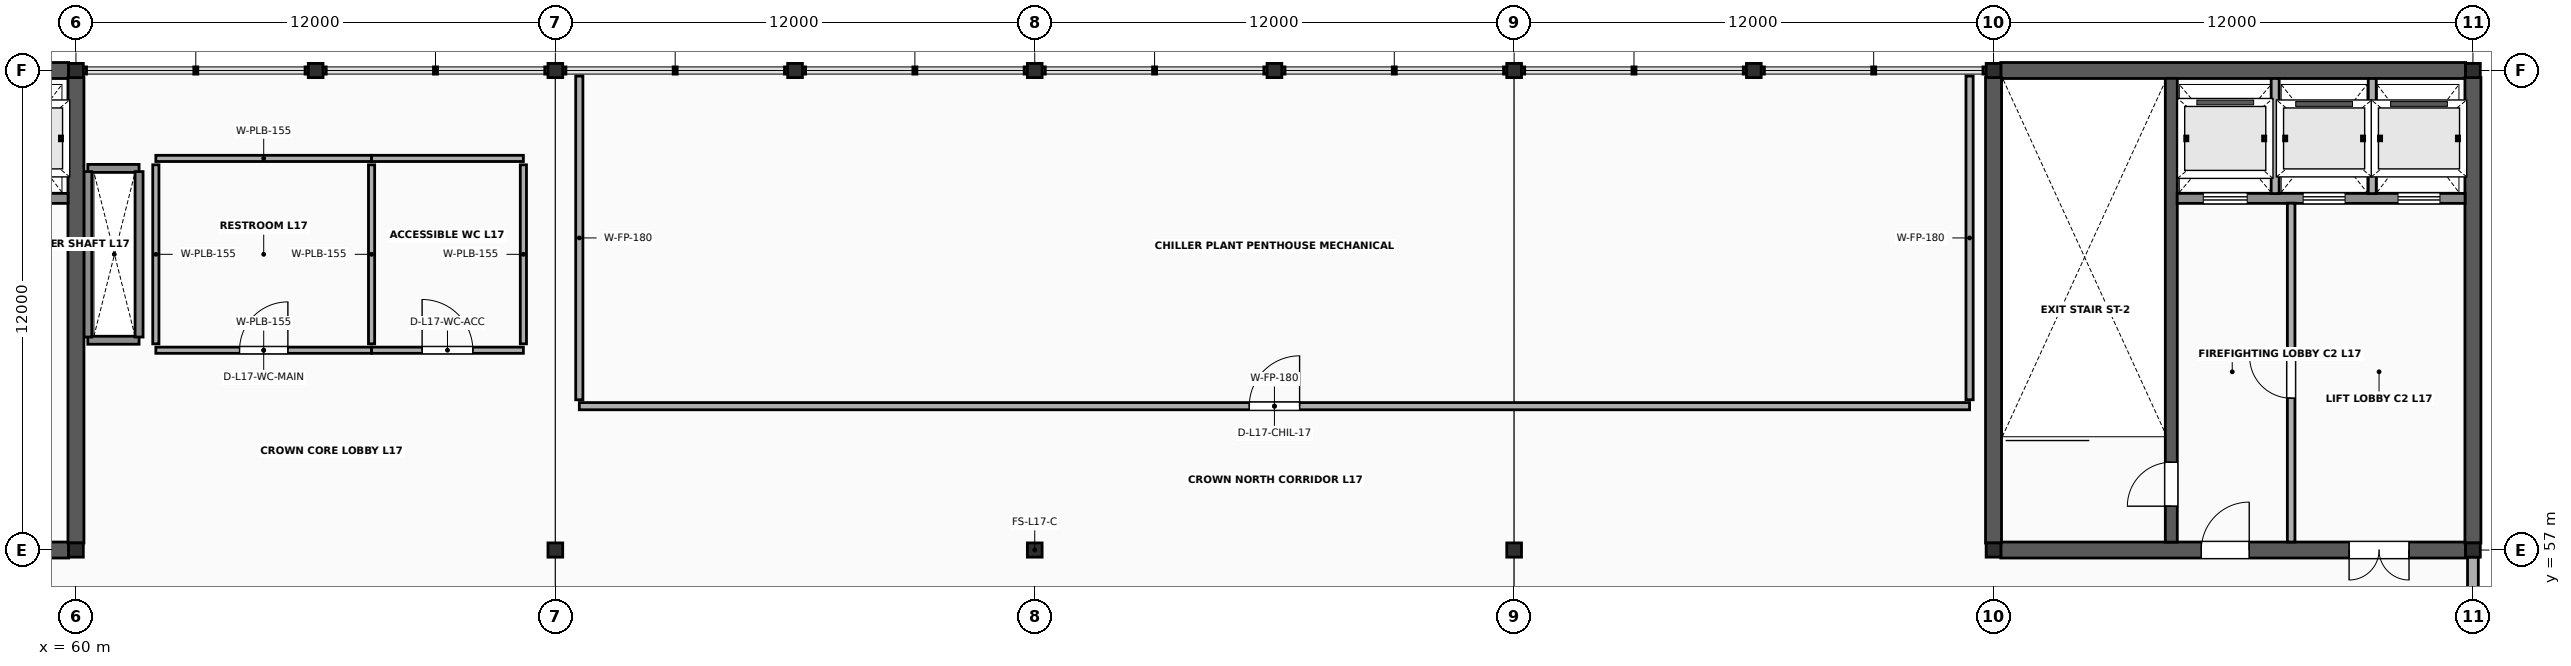
"""IFC4 building model, lengths in metres.
Left out: names, types, materials, properties, quantities, classifications, styles, units other than length and angle.
Written with IfcOpenShell. Run it as: python <this file> out.ifc"""

import sys

from ifc_helpers import new_model, si_unit, direction, frame, frame_2d, origin, origin_2d, place, context, subcontext, project, spatial, rectangle, i_section, extrude, element, fill, save


model = new_model("IFC4")
c1 = context("Model", 3, precision=1e-05, world=origin(), true_north=direction((0.0, 1.0)))
c2 = subcontext(c1, "Body", "Model", "MODEL_VIEW")
j1 = project(units=[si_unit("LENGTHUNIT", "METRE"), si_unit("PLANEANGLEUNIT", "RADIAN")], contexts=[c1])
p1 = place(None, origin())
s1 = spatial("IfcSite", under=j1, at=p1, CompositionType="ELEMENT")
p2 = place(p1, origin())
s2 = spatial("IfcBuilding", under=s1, at=p2, CompositionType="ELEMENT")
p3 = place(p2, frame((0.0, 0.0, 69.6)))
s3 = spatial("IfcBuildingStorey", under=s2, at=p3, CompositionType="ELEMENT", Elevation=69.6)
for number, where, z_axis, x_axis in (
    (1, (60.0, 57.0, 0.0), (0.0, 0.0, 1.0), (1.0, 0.0, 0.0)),
    (2, (60.0, 69.0, 0.0), (0.0, 0.0, 1.0), (1.0, 0.0, 0.0)),
    (3, (72.0, 57.0, 0.0), (0.0, 0.0, 1.0), (1.0, 0.0, 0.0)),
    (4, (72.0, 69.0, 0.0), (0.0, 0.0, 1.0), (1.0, 0.0, 0.0)),
    (5, (84.0, 57.0, 0.0), (0.0, 0.0, 1.0), (1.0, 0.0, 0.0)),
    (6, (84.0, 69.0, 0.0), (0.0, 0.0, 1.0), (1.0, 0.0, 0.0)),
    (7, (96.0, 57.0, 0.0), (0.0, 0.0, 1.0), (1.0, 0.0, 0.0)),
    (8, (96.0, 69.0, 0.0), (0.0, 0.0, 1.0), (1.0, 0.0, 0.0)),
    (9, (108.0, 57.0, 0.0), (0.0, 0.0, 1.0), (1.0, 0.0, 0.0)),
    (10, (108.0, 69.0, 0.0), (0.0, 0.0, 1.0), (1.0, 0.0, 0.0)),
    (11, (120.0, 57.0, 0.0), (0.0, 0.0, 1.0), (1.0, 0.0, 0.0)),
    (12, (120.0, 69.0, 0.0), (0.0, 0.0, 1.0), (1.0, 0.0, 0.0)),
    (13, (66.0, 69.0, 0.0), (0.0, 0.0, 1.0), (1.0, 0.0, 0.0)),
    (14, (78.0, 69.0, 0.0), (0.0, 0.0, 1.0), (1.0, 0.0, 0.0)),
    (15, (90.0, 69.0, 0.0), (0.0, 0.0, 1.0), (1.0, 0.0, 0.0)),
    (16, (102.0, 69.0, 0.0), (0.0, 0.0, 1.0), (1.0, 0.0, 0.0)),
):
    element("IfcColumn", number, at=place(p3, frame(where, z_axis=z_axis, x_axis=x_axis)), inside=s3, PredefinedType="COLUMN", context=c2, shape_type="SweptSolid", body=[
        extrude(i_section(OverallWidth=0.369, OverallDepth=0.356, WebThickness=0.011, FlangeThickness=0.018, FilletRadius=0.018, at=origin_2d()), origin(), (0.0, 0.0, 1.0), 4.6),
    ])
for number, where, z_axis, x_axis in (
    (17, (60.297, 62.25, 0.0), (0.0, 0.0, 1.0), (1.0, 0.0, 0.0)),
    (18, (60.297, 66.55, 0.0), (0.0, 0.0, 1.0), (1.0, 0.0, 0.0)),
):
    element("IfcWall", number, at=place(p3, frame(where, z_axis=z_axis, x_axis=x_axis)), inside=s3, PredefinedType="SOLIDWALL", context=c2, shape_type="SweptSolid", body=[
        extrude(rectangle(XDim=1.283, YDim=0.2, at=frame_2d((0.642, 0.0))), origin(), (0.0, 0.0, 1.0), 4.383),
    ])
for number, where, z_axis, x_axis in (
    (19, (60.297, 62.33, 0.0), (0.0, 0.0, 1.0), (0.0, 1.0, 0.0)),
    (20, (61.58, 62.33, 0.0), (0.0, 0.0, 1.0), (0.0, 1.0, 0.0)),
):
    element("IfcWall", number, at=place(p3, frame(where, z_axis=z_axis, x_axis=x_axis)), inside=s3, PredefinedType="SOLIDWALL", context=c2, shape_type="SweptSolid", body=[
        extrude(rectangle(XDim=4.14, YDim=0.2, at=frame_2d((2.07, 0.0))), origin(), (0.0, 0.0, 1.0), 4.383),
    ])
p4 = place(p3, frame((48.181, 57.0, 0.0), z_axis=(0.0, 0.0, 1.0), x_axis=(1.0, 0.0, 0.0)))
e21 = element("IfcWall", 21, at=p4, inside=s3, PredefinedType="SHEAR", context=c2, shape_type="SweptSolid", body=[
    extrude(rectangle(XDim=11.637, YDim=0.4, at=frame_2d((5.819, 0.0))), origin(), (0.0, 0.0, 1.0), 4.383),
])
p5 = place(p4, frame((5.019, 0.0, 0.0)))
e22 = element("IfcOpeningElement", 22, at=p5, cuts=e21, PredefinedType="OPENING", context=c2, shape_type="SweptSolid", body=[
    extrude(rectangle(XDim=1.2, YDim=2.2, at=frame_2d((0.6, 1.1))), frame((0.0, 0.215, 0.0), z_axis=(0.0, -1.0, 0.0), x_axis=(1.0, 0.0, 0.0)), (0.0, 0.0, 1.0), 0.43),
])
p6 = place(p4, frame((8.718, 0.0, 0.0)))
e23 = element("IfcOpeningElement", 23, at=p6, cuts=e21, PredefinedType="OPENING", context=c2, shape_type="SweptSolid", body=[
    extrude(rectangle(XDim=1.5, YDim=2.25, at=frame_2d((0.75, 1.125))), frame((0.0, 0.215, 0.0), z_axis=(0.0, -1.0, 0.0), x_axis=(1.0, 0.0, 0.0)), (0.0, 0.0, 1.0), 0.43),
])
p7 = place(p3, frame((48.181, 69.0, 0.0), z_axis=(0.0, 0.0, 1.0), x_axis=(1.0, 0.0, 0.0)))
e24 = element("IfcWall", 24, at=p7, inside=s3, PredefinedType="SHEAR", context=c2, shape_type="SweptSolid", body=[
    extrude(rectangle(XDim=11.637, YDim=0.4, at=frame_2d((5.819, 0.0))), origin(), (0.0, 0.0, 1.0), 4.383),
])
p8 = place(p3, frame((60.0, 57.175, 0.0), z_axis=(0.0, 0.0, 1.0), x_axis=(0.0, 1.0, 0.0)))
e25 = element("IfcWall", 25, at=p8, inside=s3, PredefinedType="SHEAR", context=c2, shape_type="SweptSolid", body=[
    extrude(rectangle(XDim=11.65, YDim=0.4, at=frame_2d((5.825, 0.0))), origin(), (0.0, 0.0, 1.0), 4.383),
])
p9 = place(p3, frame((52.597, 65.8, 0.0), z_axis=(0.0, 0.0, 1.0), x_axis=(1.0, 0.0, 0.0)))
e26 = element("IfcWall", 26, at=p9, inside=s3, PredefinedType="SOLIDWALL", context=c2, shape_type="SweptSolid", body=[
    extrude(rectangle(XDim=7.206, YDim=0.25, at=frame_2d((3.603, 0.0))), origin(), (0.0, 0.0, 1.0), 4.383),
])
p10 = place(p9, frame((0.653, 0.0, 0.0)))
e27 = element("IfcOpeningElement", 27, at=p10, cuts=e26, PredefinedType="OPENING", context=c2, shape_type="SweptSolid", body=[
    extrude(rectangle(XDim=1.1, YDim=2.24, at=frame_2d((0.55, 1.12))), frame((0.0, 0.14, 0.0), z_axis=(0.0, -1.0, 0.0), x_axis=(1.0, 0.0, 0.0)), (0.0, 0.0, 1.0), 0.28),
])
p11 = place(p9, frame((3.153, 0.0, 0.0)))
e28 = element("IfcOpeningElement", 28, at=p11, cuts=e26, PredefinedType="OPENING", context=c2, shape_type="SweptSolid", body=[
    extrude(rectangle(XDim=1.05, YDim=2.2, at=frame_2d((0.525, 1.1))), frame((0.0, 0.14, 0.0), z_axis=(0.0, -1.0, 0.0), x_axis=(1.0, 0.0, 0.0)), (0.0, 0.0, 1.0), 0.28),
])
p12 = place(p9, frame((5.528, 0.0, 0.0)))
e29 = element("IfcOpeningElement", 29, at=p12, cuts=e26, PredefinedType="OPENING", context=c2, shape_type="SweptSolid", body=[
    extrude(rectangle(XDim=1.05, YDim=2.2, at=frame_2d((0.525, 1.1))), frame((0.0, 0.14, 0.0), z_axis=(0.0, -1.0, 0.0), x_axis=(1.0, 0.0, 0.0)), (0.0, 0.0, 1.0), 0.28),
])
p13 = place(p3, frame((108.181, 57.0, 0.0), z_axis=(0.0, 0.0, 1.0), x_axis=(1.0, 0.0, 0.0)))
e30 = element("IfcWall", 30, at=p13, inside=s3, PredefinedType="SHEAR", context=c2, shape_type="SweptSolid", body=[
    extrude(rectangle(XDim=11.637, YDim=0.4, at=frame_2d((5.819, 0.0))), origin(), (0.0, 0.0, 1.0), 4.383),
])
p14 = place(p13, frame((5.019, 0.0, 0.0)))
e31 = element("IfcOpeningElement", 31, at=p14, cuts=e30, PredefinedType="OPENING", context=c2, shape_type="SweptSolid", body=[
    extrude(rectangle(XDim=1.2, YDim=2.2, at=frame_2d((0.6, 1.1))), frame((0.0, 0.215, 0.0), z_axis=(0.0, -1.0, 0.0), x_axis=(1.0, 0.0, 0.0)), (0.0, 0.0, 1.0), 0.43),
])
p15 = place(p13, frame((8.719, 0.0, 0.0)))
e32 = element("IfcOpeningElement", 32, at=p15, cuts=e30, PredefinedType="OPENING", context=c2, shape_type="SweptSolid", body=[
    extrude(rectangle(XDim=1.5, YDim=2.25, at=frame_2d((0.75, 1.125))), frame((0.0, 0.215, 0.0), z_axis=(0.0, -1.0, 0.0), x_axis=(1.0, 0.0, 0.0)), (0.0, 0.0, 1.0), 0.43),
])
p16 = place(p3, frame((108.181, 69.0, 0.0), z_axis=(0.0, 0.0, 1.0), x_axis=(1.0, 0.0, 0.0)))
e33 = element("IfcWall", 33, at=p16, inside=s3, PredefinedType="SHEAR", context=c2, shape_type="SweptSolid", body=[
    extrude(rectangle(XDim=11.637, YDim=0.4, at=frame_2d((5.819, 0.0))), origin(), (0.0, 0.0, 1.0), 4.383),
])
for number, where, z_axis, x_axis in (
    (34, (108.0, 57.175, 0.0), (0.0, 0.0, 1.0), (0.0, 1.0, 0.0)),
    (35, (120.0, 57.175, 0.0), (0.0, 0.0, 1.0), (0.0, 1.0, 0.0)),
):
    element("IfcWall", number, at=place(p3, frame(where, z_axis=z_axis, x_axis=x_axis)), inside=s3, PredefinedType="SHEAR", context=c2, shape_type="SweptSolid", body=[
        extrude(rectangle(XDim=11.65, YDim=0.4, at=frame_2d((5.825, 0.0))), origin(), (0.0, 0.0, 1.0), 4.383),
    ])
p17 = place(p3, frame((112.45, 57.197, 0.0), z_axis=(0.0, 0.0, 1.0), x_axis=(0.0, 1.0, 0.0)))
e36 = element("IfcWall", 36, at=p17, inside=s3, PredefinedType="SHEAR", context=c2, shape_type="SweptSolid", body=[
    extrude(rectangle(XDim=11.606, YDim=0.3, at=frame_2d((5.803, 0.0))), origin(), (0.0, 0.0, 1.0), 4.383),
])
p18 = place(p17, frame((0.9, 0.0, 0.0)))
e37 = element("IfcOpeningElement", 37, at=p18, cuts=e36, PredefinedType="OPENING", context=c2, shape_type="SweptSolid", body=[
    extrude(rectangle(XDim=1.1, YDim=2.2, at=frame_2d((0.55, 1.1))), frame((0.0, 0.165, 0.0), z_axis=(0.0, -1.0, 0.0), x_axis=(1.0, 0.0, 0.0)), (0.0, 0.0, 1.0), 0.33),
])
p19 = place(p3, frame((112.597, 65.8, 0.0), z_axis=(0.0, 0.0, 1.0), x_axis=(1.0, 0.0, 0.0)))
e38 = element("IfcWall", 38, at=p19, inside=s3, PredefinedType="SOLIDWALL", context=c2, shape_type="SweptSolid", body=[
    extrude(rectangle(XDim=7.206, YDim=0.25, at=frame_2d((3.603, 0.0))), origin(), (0.0, 0.0, 1.0), 4.383),
])
p20 = place(p19, frame((0.653, 0.0, 0.0)))
e39 = element("IfcOpeningElement", 39, at=p20, cuts=e38, PredefinedType="OPENING", context=c2, shape_type="SweptSolid", body=[
    extrude(rectangle(XDim=1.1, YDim=2.24, at=frame_2d((0.55, 1.12))), frame((0.0, 0.14, 0.0), z_axis=(0.0, -1.0, 0.0), x_axis=(1.0, 0.0, 0.0)), (0.0, 0.0, 1.0), 0.28),
])
p21 = place(p19, frame((3.153, 0.0, 0.0)))
e40 = element("IfcOpeningElement", 40, at=p21, cuts=e38, PredefinedType="OPENING", context=c2, shape_type="SweptSolid", body=[
    extrude(rectangle(XDim=1.05, YDim=2.2, at=frame_2d((0.525, 1.1))), frame((0.0, 0.14, 0.0), z_axis=(0.0, -1.0, 0.0), x_axis=(1.0, 0.0, 0.0)), (0.0, 0.0, 1.0), 0.28),
])
p22 = place(p19, frame((5.528, 0.0, 0.0)))
e41 = element("IfcOpeningElement", 41, at=p22, cuts=e38, PredefinedType="OPENING", context=c2, shape_type="SweptSolid", body=[
    extrude(rectangle(XDim=1.05, YDim=2.2, at=frame_2d((0.525, 1.1))), frame((0.0, 0.14, 0.0), z_axis=(0.0, -1.0, 0.0), x_axis=(1.0, 0.0, 0.0)), (0.0, 0.0, 1.0), 0.28),
])
for number, where, z_axis, x_axis in (
    (42, (115.05, 65.92, 0.0), (0.0, 0.0, 1.0), (0.0, 1.0, 0.0)),
    (43, (117.48, 65.92, 0.0), (0.0, 0.0, 1.0), (0.0, 1.0, 0.0)),
):
    element("IfcWall", number, at=place(p3, frame(where, z_axis=z_axis, x_axis=x_axis)), inside=s3, PredefinedType="SOLIDWALL", context=c2, shape_type="SweptSolid", body=[
        extrude(rectangle(XDim=2.88, YDim=0.2, at=frame_2d((1.44, 0.0))), origin(), (0.0, 0.0, 1.0), 4.373),
    ])
p23 = place(p3, frame((115.45, 57.2, 0.0), z_axis=(0.0, 0.0, 1.0), x_axis=(0.0, 1.0, 0.0)))
e44 = element("IfcWall", 44, at=p23, inside=s3, PredefinedType="SOLIDWALL", context=c2, shape_type="SweptSolid", body=[
    extrude(rectangle(XDim=8.48, YDim=0.19, at=frame_2d((4.24, 0.0))), origin(), (0.0, 0.0, 1.0), 4.373),
])
p24 = place(p23, frame((3.6, 0.0, 0.0)))
e45 = element("IfcOpeningElement", 45, at=p24, cuts=e44, PredefinedType="OPENING", context=c2, shape_type="SweptSolid", body=[
    extrude(rectangle(XDim=1.04, YDim=2.18, at=frame_2d((0.52, 1.09))), frame((0.0, 0.11, 0.0), z_axis=(0.0, -1.0, 0.0), x_axis=(1.0, 0.0, 0.0)), (0.0, 0.0, 1.0), 0.22),
])
p25 = place(p3, frame((120.0, 45.176, 0.0), z_axis=(0.0, 0.0, 1.0), x_axis=(0.0, 1.0, 0.0)))
e46 = element("IfcWall", 46, at=p25, inside=s3, PredefinedType="SOLIDWALL", context=c2, shape_type="SweptSolid", body=[
    extrude(rectangle(XDim=11.648, YDim=0.27, at=frame_2d((5.824, 0.0))), origin(), (0.0, 0.0, 1.0), 3.836),
])
p26 = place(p25, frame((4.399, 0.0, 1.4)))
e47 = element("IfcOpeningElement", 47, at=p26, cuts=e46, PredefinedType="OPENING", context=c2, shape_type="SweptSolid", body=[
    extrude(rectangle(XDim=2.85, YDim=0.88, at=frame_2d((1.425, 0.44))), frame((0.0, 0.15, 0.0), z_axis=(0.0, -1.0, 0.0), x_axis=(1.0, 0.0, 0.0)), (0.0, 0.0, 1.0), 0.3),
])
p27 = place(p3, frame((62.0, 62.0, 0.0), z_axis=(0.0, 0.0, 1.0), x_axis=(1.0, 0.0, 0.0)))
e48 = element("IfcWall", 48, at=p27, inside=s3, PredefinedType="PLUMBINGWALL", context=c2, shape_type="SweptSolid", body=[
    extrude(rectangle(XDim=5.4, YDim=0.155, at=frame_2d((2.7, 0.0))), origin(), (0.0, 0.0, 1.0), 2.88),
])
p28 = place(p27, frame((2.095, 0.0, 0.0)))
e49 = element("IfcOpeningElement", 49, at=p28, cuts=e48, PredefinedType="OPENING", context=c2, shape_type="SweptSolid", body=[
    extrude(rectangle(XDim=1.21, YDim=2.25, at=frame_2d((0.605, 1.125))), frame((0.0, 0.093, 0.0), z_axis=(0.0, -1.0, 0.0), x_axis=(1.0, 0.0, 0.0)), (0.0, 0.0, 1.0), 0.185),
])
p29 = place(p3, frame((62.0, 66.8, 0.0), z_axis=(0.0, 0.0, 1.0), x_axis=(1.0, 0.0, 0.0)))
e50 = element("IfcWall", 50, at=p29, inside=s3, PredefinedType="PLUMBINGWALL", context=c2, shape_type="SweptSolid", body=[
    extrude(rectangle(XDim=5.4, YDim=0.155, at=frame_2d((2.7, 0.0))), origin(), (0.0, 0.0, 1.0), 2.88),
])
for number, where, z_axis, x_axis in (
    (51, (62.0, 62.16, 0.0), (0.0, 0.0, 1.0), (0.0, 1.0, 0.0)),
    (52, (67.4, 62.16, 0.0), (0.0, 0.0, 1.0), (0.0, 1.0, 0.0)),
):
    element("IfcWall", number, at=place(p3, frame(where, z_axis=z_axis, x_axis=x_axis)), inside=s3, PredefinedType="PLUMBINGWALL", context=c2, shape_type="SweptSolid", body=[
        extrude(rectangle(XDim=4.48, YDim=0.155, at=frame_2d((2.24, 0.0))), origin(), (0.0, 0.0, 1.0), 2.88),
    ])
p30 = place(p3, frame((67.4, 62.0, 0.0), z_axis=(0.0, 0.0, 1.0), x_axis=(1.0, 0.0, 0.0)))
e53 = element("IfcWall", 53, at=p30, inside=s3, PredefinedType="PLUMBINGWALL", context=c2, shape_type="SweptSolid", body=[
    extrude(rectangle(XDim=3.8, YDim=0.155, at=frame_2d((1.9, 0.0))), origin(), (0.0, 0.0, 1.0), 2.88),
])
p31 = place(p30, frame((1.265, 0.0, 0.0)))
e54 = element("IfcOpeningElement", 54, at=p31, cuts=e53, PredefinedType="OPENING", context=c2, shape_type="SweptSolid", body=[
    extrude(rectangle(XDim=1.27, YDim=2.27, at=frame_2d((0.635, 1.135))), frame((0.0, 0.093, 0.0), z_axis=(0.0, -1.0, 0.0), x_axis=(1.0, 0.0, 0.0)), (0.0, 0.0, 1.0), 0.185),
])
p32 = place(p3, frame((67.4, 66.8, 0.0), z_axis=(0.0, 0.0, 1.0), x_axis=(1.0, 0.0, 0.0)))
e55 = element("IfcWall", 55, at=p32, inside=s3, PredefinedType="PLUMBINGWALL", context=c2, shape_type="SweptSolid", body=[
    extrude(rectangle(XDim=3.8, YDim=0.155, at=frame_2d((1.9, 0.0))), origin(), (0.0, 0.0, 1.0), 2.88),
])
p33 = place(p3, frame((71.2, 62.16, 0.0), z_axis=(0.0, 0.0, 1.0), x_axis=(0.0, 1.0, 0.0)))
e56 = element("IfcWall", 56, at=p33, inside=s3, PredefinedType="PLUMBINGWALL", context=c2, shape_type="SweptSolid", body=[
    extrude(rectangle(XDim=4.48, YDim=0.155, at=frame_2d((2.24, 0.0))), origin(), (0.0, 0.0, 1.0), 2.88),
])
p34 = place(p3, frame((72.6, 60.6, 0.0), z_axis=(0.0, 0.0, 1.0), x_axis=(1.0, 0.0, 0.0)))
e57 = element("IfcWall", 57, at=p34, inside=s3, PredefinedType="SOLIDWALL", context=c2, shape_type="SweptSolid", body=[
    extrude(rectangle(XDim=34.8, YDim=0.18, at=frame_2d((17.4, 0.0))), origin(), (0.0, 0.0, 1.0), 2.88),
])
p35 = place(p34, frame((16.77, 0.0, 0.0)))
e58 = element("IfcOpeningElement", 58, at=p35, cuts=e57, PredefinedType="OPENING", context=c2, shape_type="SweptSolid", body=[
    extrude(rectangle(XDim=1.26, YDim=2.16, at=frame_2d((0.63, 1.08))), frame((0.0, 0.105, 0.0), z_axis=(0.0, -1.0, 0.0), x_axis=(1.0, 0.0, 0.0)), (0.0, 0.0, 1.0), 0.21),
])
for number, where, z_axis, x_axis in (
    (59, (72.6, 60.76, 0.0), (0.0, 0.0, 1.0), (0.0, 1.0, 0.0)),
    (60, (107.4, 60.76, 0.0), (0.0, 0.0, 1.0), (0.0, 1.0, 0.0)),
):
    element("IfcWall", number, at=place(p3, frame(where, z_axis=z_axis, x_axis=x_axis)), inside=s3, PredefinedType="SOLIDWALL", context=c2, shape_type="SweptSolid", body=[
        extrude(rectangle(XDim=8.1, YDim=0.18, at=frame_2d((4.05, 0.0))), origin(), (0.0, 0.0, 1.0), 2.88),
    ])
p36 = place(p18, origin())
e61 = element("IfcDoor", 61, at=p36, inside=s3, OperationType="SINGLE_SWING_LEFT", PredefinedType="DOOR", context=c2, shape_type="SweptSolid", body=[
    extrude(rectangle(XDim=1.1, YDim=2.2, at=frame_2d((0.55, 1.1))), frame((0.0, 0.025, 0.0), z_axis=(0.0, -1.0, 0.0), x_axis=(1.0, 0.0, 0.0)), (0.0, 0.0, 1.0), 0.05),
])
fill(e37, e61)
p37 = place(p24, origin())
e62 = element("IfcDoor", 62, at=p37, inside=s3, OperationType="SINGLE_SWING_RIGHT", PredefinedType="DOOR", context=c2, shape_type="SweptSolid", body=[
    extrude(rectangle(XDim=1.04, YDim=2.18, at=frame_2d((0.52, 1.09))), frame((0.0, 0.025, 0.0), z_axis=(0.0, -1.0, 0.0), x_axis=(1.0, 0.0, 0.0)), (0.0, 0.0, 1.0), 0.05),
])
fill(e45, e62)
p38 = place(p14, origin())
e63 = element("IfcDoor", 63, at=p38, inside=s3, OperationType="SINGLE_SWING_RIGHT", PredefinedType="DOOR", context=c2, shape_type="SweptSolid", body=[
    extrude(rectangle(XDim=1.2, YDim=2.2, at=frame_2d((0.6, 1.1))), frame((0.0, 0.025, 0.0), z_axis=(0.0, -1.0, 0.0), x_axis=(1.0, 0.0, 0.0)), (0.0, 0.0, 1.0), 0.05),
])
fill(e31, e63)
p39 = place(p15, origin())
e64 = element("IfcDoor", 64, at=p39, inside=s3, OperationType="DOUBLE_DOOR_SINGLE_SWING", PredefinedType="DOOR", context=c2, shape_type="SweptSolid", body=[
    extrude(rectangle(XDim=1.5, YDim=2.25, at=frame_2d((0.75, 1.125))), frame((0.0, 0.025, 0.0), z_axis=(0.0, -1.0, 0.0), x_axis=(1.0, 0.0, 0.0)), (0.0, 0.0, 1.0), 0.05),
])
fill(e32, e64)
p40 = place(p20, origin())
e65 = element("IfcDoor", 65, at=p40, inside=s3, OperationType="SLIDING_TO_LEFT", PredefinedType="USERDEFINED", context=c2, shape_type="SweptSolid", body=[
    extrude(rectangle(XDim=1.1, YDim=2.24, at=frame_2d((0.55, 1.12))), frame((0.0, 0.025, 0.0), z_axis=(0.0, -1.0, 0.0), x_axis=(1.0, 0.0, 0.0)), (0.0, 0.0, 1.0), 0.05),
])
fill(e39, e65)
p41 = place(p21, origin())
e66 = element("IfcDoor", 66, at=p41, inside=s3, OperationType="SLIDING_TO_LEFT", PredefinedType="USERDEFINED", context=c2, shape_type="SweptSolid", body=[
    extrude(rectangle(XDim=1.05, YDim=2.2, at=frame_2d((0.525, 1.1))), frame((0.0, 0.025, 0.0), z_axis=(0.0, -1.0, 0.0), x_axis=(1.0, 0.0, 0.0)), (0.0, 0.0, 1.0), 0.05),
])
fill(e40, e66)
p42 = place(p22, origin())
e67 = element("IfcDoor", 67, at=p42, inside=s3, OperationType="SLIDING_TO_LEFT", PredefinedType="USERDEFINED", context=c2, shape_type="SweptSolid", body=[
    extrude(rectangle(XDim=1.05, YDim=2.2, at=frame_2d((0.525, 1.1))), frame((0.0, 0.025, 0.0), z_axis=(0.0, -1.0, 0.0), x_axis=(1.0, 0.0, 0.0)), (0.0, 0.0, 1.0), 0.05),
])
fill(e41, e67)
p43 = place(p28, origin())
e68 = element("IfcDoor", 68, at=p43, inside=s3, OperationType="SINGLE_SWING_RIGHT", PredefinedType="DOOR", context=c2, shape_type="SweptSolid", body=[
    extrude(rectangle(XDim=1.21, YDim=2.25, at=frame_2d((0.605, 1.125))), frame((0.0, 0.025, 0.0), z_axis=(0.0, -1.0, 0.0), x_axis=(1.0, 0.0, 0.0)), (0.0, 0.0, 1.0), 0.05),
])
fill(e49, e68)
p44 = place(p31, origin())
e69 = element("IfcDoor", 69, at=p44, inside=s3, OperationType="SINGLE_SWING_LEFT", PredefinedType="DOOR", context=c2, shape_type="SweptSolid", body=[
    extrude(rectangle(XDim=1.27, YDim=2.27, at=frame_2d((0.635, 1.135))), frame((0.0, 0.025, 0.0), z_axis=(0.0, -1.0, 0.0), x_axis=(1.0, 0.0, 0.0)), (0.0, 0.0, 1.0), 0.05),
])
fill(e54, e69)
p45 = place(p35, origin())
e70 = element("IfcDoor", 70, at=p45, inside=s3, OperationType="SINGLE_SWING_RIGHT", PredefinedType="DOOR", context=c2, shape_type="SweptSolid", body=[
    extrude(rectangle(XDim=1.26, YDim=2.16, at=frame_2d((0.63, 1.08))), frame((0.0, 0.025, 0.0), z_axis=(0.0, -1.0, 0.0), x_axis=(1.0, 0.0, 0.0)), (0.0, 0.0, 1.0), 0.05),
])
fill(e58, e70)
save(model, sys.argv[1])
